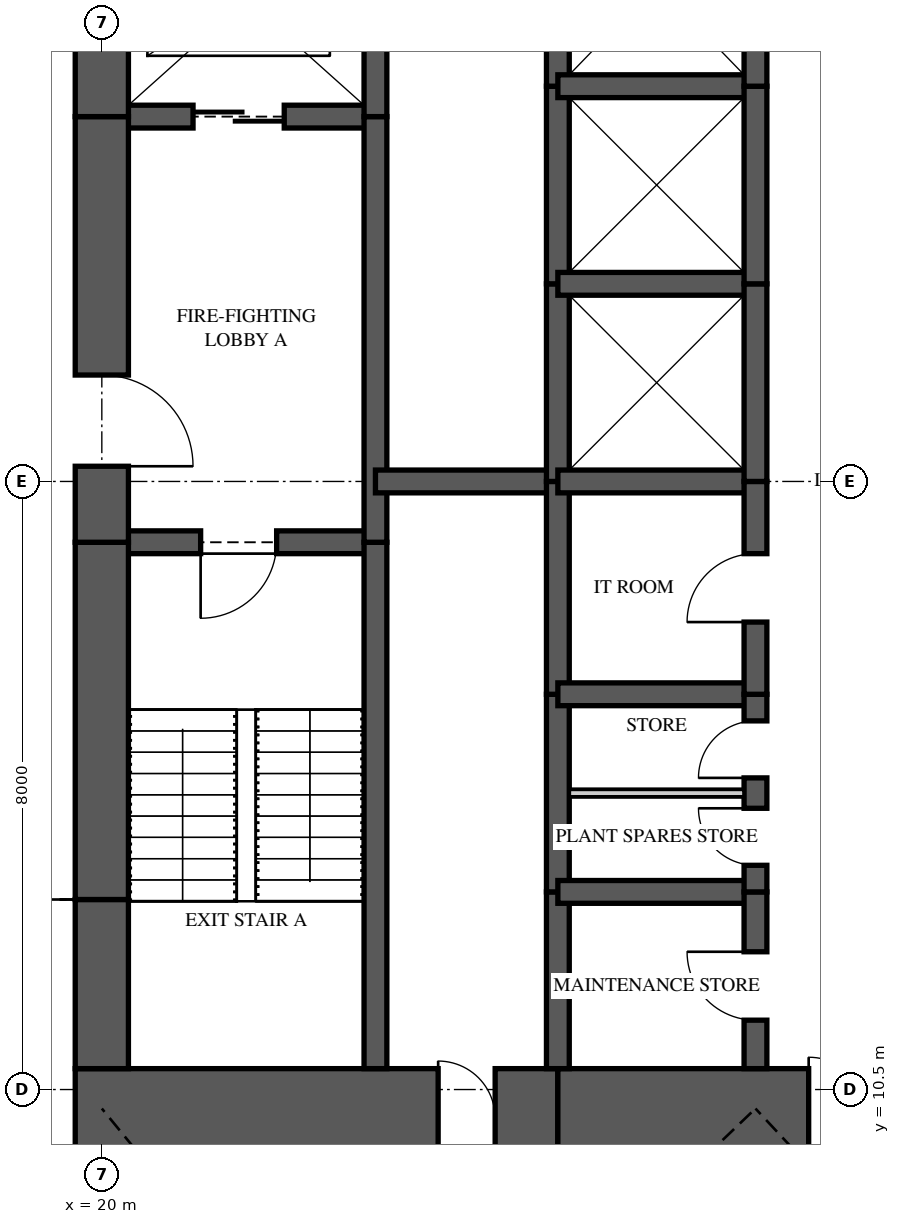
"""IFC4 building model, lengths in metres.
Left out: names, types, materials, properties, quantities, classifications, styles, units other than length and angle.
Written with IfcOpenShell. Run it as: python <this file> out.ifc"""

import sys

from ifc_helpers import new_model, si_unit, direction, frame, frame_2d, origin, place, context, subcontext, project, spatial, rectangle, extrude, element, fill, save


model = new_model("IFC4")
c1 = context("Model", 3, precision=1e-05, world=origin(), true_north=direction((0.0, 1.0)))
c2 = subcontext(c1, "Body", "Model", "MODEL_VIEW")
j1 = project(units=[si_unit("LENGTHUNIT", "METRE"), si_unit("PLANEANGLEUNIT", "RADIAN")], contexts=[c1])
p1 = place(None, origin())
s1 = spatial("IfcSite", under=j1, at=p1, CompositionType="ELEMENT")
p2 = place(p1, origin())
s2 = spatial("IfcBuilding", under=s1, at=p2, CompositionType="ELEMENT")
p3 = place(p2, frame((0.0, 0.0, 212.95)))
s3 = spatial("IfcBuildingStorey", under=s2, at=p3, CompositionType="ELEMENT", Elevation=212.95)
p4 = place(p3, frame((19.65, 10.125, 0.0), z_axis=(0.0, 0.0, 1.0), x_axis=(1.0, 0.0, 0.0)))
e1 = element("IfcWall", 1, at=p4, inside=s3, PredefinedType="SHEAR", context=c2, shape_type="SweptSolid", body=[
    extrude(rectangle(XDim=6.35, YDim=1.3, at=frame_2d((3.175, 0.0))), origin(), (0.0, 0.0, 1.0), 5.0),
])
p5 = place(p4, frame((4.775, 0.0, 0.0)))
e2 = element("IfcOpeningElement", 2, at=p5, cuts=e1, PredefinedType="OPENING", context=c2, shape_type="SweptSolid", body=[
    extrude(rectangle(XDim=0.75, YDim=2.1, at=frame_2d((0.375, 1.05))), frame((0.0, 0.66, 0.0), z_axis=(0.0, -1.0, 0.0), x_axis=(1.0, 0.0, 0.0)), (0.0, 0.0, 1.0), 1.32),
])
p6 = place(p3, frame((26.0, 10.125, 0.0), z_axis=(0.0, 0.0, 1.0), x_axis=(1.0, 0.0, 0.0)))
e3 = element("IfcWall", 3, at=p6, inside=s3, PredefinedType="SHEAR", context=c2, shape_type="SweptSolid", body=[
    extrude(rectangle(XDim=5.6, YDim=1.3, at=frame_2d((2.8, 0.0))), origin(), (0.0, 0.0, 1.0), 5.0),
])
p7 = place(p6, frame((3.3, 0.0, 0.0)))
e4 = element("IfcOpeningElement", 4, at=p7, cuts=e3, PredefinedType="OPENING", context=c2, shape_type="SweptSolid", body=[
    extrude(rectangle(XDim=1.6, YDim=2.1, at=frame_2d((0.8, 1.05))), frame((0.0, 0.66, 0.0), z_axis=(0.0, -1.0, 0.0), x_axis=(1.0, 0.0, 0.0)), (0.0, 0.0, 1.0), 1.32),
])
p8 = place(p3, frame((20.0, 26.225, 0.0), z_axis=(0.0, 0.0, 1.0), x_axis=(0.0, -1.0, 0.0)))
e5 = element("IfcWall", 5, at=p8, inside=s3, PredefinedType="SHEAR", context=c2, shape_type="SweptSolid", body=[
    extrude(rectangle(XDim=2.925, YDim=0.7, at=frame_2d((1.462, 0.0))), origin(), (0.0, 0.0, 1.0), 5.0),
])
p9 = place(p3, frame((20.0, 23.3, 0.0), z_axis=(0.0, 0.0, 1.0), x_axis=(0.0, -1.0, 0.0)))
e6 = element("IfcWall", 6, at=p9, inside=s3, PredefinedType="SHEAR", context=c2, shape_type="SweptSolid", body=[
    extrude(rectangle(XDim=5.6, YDim=0.7, at=frame_2d((2.8, 0.0))), origin(), (0.0, 0.0, 1.0), 5.0),
])
p10 = place(p9, frame((3.4, 0.0, 0.0)))
e7 = element("IfcOpeningElement", 7, at=p10, cuts=e6, PredefinedType="OPENING", context=c2, shape_type="SweptSolid", body=[
    extrude(rectangle(XDim=1.2, YDim=2.2, at=frame_2d((0.6, 1.1))), frame((0.0, 0.36, 0.0), z_axis=(0.0, -1.0, 0.0), x_axis=(1.0, 0.0, 0.0)), (0.0, 0.0, 1.0), 0.72),
])
p11 = place(p3, frame((20.0, 17.7, 0.0), z_axis=(0.0, 0.0, 1.0), x_axis=(0.0, -1.0, 0.0)))
e8 = element("IfcWall", 8, at=p11, inside=s3, PredefinedType="SHEAR", context=c2, shape_type="SweptSolid", body=[
    extrude(rectangle(XDim=4.7, YDim=0.7, at=frame_2d((2.35, 0.0))), origin(), (0.0, 0.0, 1.0), 5.0),
])
p12 = place(p3, frame((20.0, 13.0, 0.0), z_axis=(0.0, 0.0, 1.0), x_axis=(0.0, -1.0, 0.0)))
e9 = element("IfcWall", 9, at=p12, inside=s3, PredefinedType="SHEAR", context=c2, shape_type="SweptSolid", body=[
    extrude(rectangle(XDim=2.225, YDim=0.7, at=frame_2d((1.113, 0.0))), origin(), (0.0, 0.0, 1.0), 5.0),
])
p13 = place(p3, frame((23.6, 10.775, 0.0), z_axis=(0.0, 0.0, 1.0), x_axis=(0.0, 1.0, 0.0)))
e10 = element("IfcWall", 10, at=p13, inside=s3, PredefinedType="SHEAR", context=c2, shape_type="SweptSolid", body=[
    extrude(rectangle(XDim=6.925, YDim=0.3, at=frame_2d((3.462, 0.0))), origin(), (0.0, 0.0, 1.0), 5.0),
])
p14 = place(p3, frame((23.6, 17.7, 0.0), z_axis=(0.0, 0.0, 1.0), x_axis=(0.0, 1.0, 0.0)))
e11 = element("IfcWall", 11, at=p14, inside=s3, PredefinedType="SHEAR", context=c2, shape_type="SweptSolid", body=[
    extrude(rectangle(XDim=5.6, YDim=0.3, at=frame_2d((2.8, 0.0))), origin(), (0.0, 0.0, 1.0), 5.0),
])
p15 = place(p3, frame((23.6, 23.3, 0.0), z_axis=(0.0, 0.0, 1.0), x_axis=(0.0, 1.0, 0.0)))
e12 = element("IfcWall", 12, at=p15, inside=s3, PredefinedType="SHEAR", context=c2, shape_type="SweptSolid", body=[
    extrude(rectangle(XDim=2.925, YDim=0.3, at=frame_2d((1.462, 0.0))), origin(), (0.0, 0.0, 1.0), 5.0),
])
p16 = place(p3, frame((26.0, 10.775, 0.0), z_axis=(0.0, 0.0, 1.0), x_axis=(0.0, 1.0, 0.0)))
e13 = element("IfcWall", 13, at=p16, inside=s3, PredefinedType="SHEAR", context=c2, shape_type="SweptSolid", body=[
    extrude(rectangle(XDim=2.325, YDim=0.3, at=frame_2d((1.163, 0.0))), origin(), (0.0, 0.0, 1.0), 5.0),
])
p17 = place(p3, frame((26.0, 13.1, 0.0), z_axis=(0.0, 0.0, 1.0), x_axis=(0.0, 1.0, 0.0)))
e14 = element("IfcWall", 14, at=p17, inside=s3, PredefinedType="SHEAR", context=c2, shape_type="SweptSolid", body=[
    extrude(rectangle(XDim=2.6, YDim=0.3, at=frame_2d((1.3, 0.0))), origin(), (0.0, 0.0, 1.0), 5.0),
])
p18 = place(p3, frame((26.0, 15.7, 0.0), z_axis=(0.0, 0.0, 1.0), x_axis=(0.0, 1.0, 0.0)))
e15 = element("IfcWall", 15, at=p18, inside=s3, PredefinedType="SHEAR", context=c2, shape_type="SweptSolid", body=[
    extrude(rectangle(XDim=2.8, YDim=0.3, at=frame_2d((1.4, 0.0))), origin(), (0.0, 0.0, 1.0), 5.0),
])
p19 = place(p3, frame((26.0, 18.5, 0.0), z_axis=(0.0, 0.0, 1.0), x_axis=(0.0, 1.0, 0.0)))
e16 = element("IfcWall", 16, at=p19, inside=s3, PredefinedType="SHEAR", context=c2, shape_type="SweptSolid", body=[
    extrude(rectangle(XDim=2.6, YDim=0.3, at=frame_2d((1.3, 0.0))), origin(), (0.0, 0.0, 1.0), 5.0),
])
p20 = place(p3, frame((26.0, 21.1, 0.0), z_axis=(0.0, 0.0, 1.0), x_axis=(0.0, 1.0, 0.0)))
e17 = element("IfcWall", 17, at=p20, inside=s3, PredefinedType="SHEAR", context=c2, shape_type="SweptSolid", body=[
    extrude(rectangle(XDim=2.6, YDim=0.3, at=frame_2d((1.3, 0.0))), origin(), (0.0, 0.0, 1.0), 5.0),
])
p21 = place(p3, frame((26.0, 23.7, 0.0), z_axis=(0.0, 0.0, 1.0), x_axis=(0.0, 1.0, 0.0)))
e18 = element("IfcWall", 18, at=p21, inside=s3, PredefinedType="SHEAR", context=c2, shape_type="SweptSolid", body=[
    extrude(rectangle(XDim=2.525, YDim=0.3, at=frame_2d((1.263, 0.0))), origin(), (0.0, 0.0, 1.0), 5.0),
])
p22 = place(p3, frame((28.6, 10.775, 0.0), z_axis=(0.0, 0.0, 1.0), x_axis=(0.0, 1.0, 0.0)))
e19 = element("IfcWall", 19, at=p22, inside=s3, PredefinedType="SHEAR", context=c2, shape_type="SweptSolid", body=[
    extrude(rectangle(XDim=2.325, YDim=0.3, at=frame_2d((1.163, 0.0))), origin(), (0.0, 0.0, 1.0), 5.0),
])
p23 = place(p22, frame((0.637, 0.0, 0.0)))
e20 = element("IfcOpeningElement", 20, at=p23, cuts=e19, PredefinedType="OPENING", context=c2, shape_type="SweptSolid", body=[
    extrude(rectangle(XDim=0.9, YDim=2.1, at=frame_2d((0.45, 1.05))), frame((0.0, 0.16, 0.0), z_axis=(0.0, -1.0, 0.0), x_axis=(1.0, 0.0, 0.0)), (0.0, 0.0, 1.0), 0.32),
])
p24 = place(p3, frame((28.6, 13.1, 0.0), z_axis=(0.0, 0.0, 1.0), x_axis=(0.0, 1.0, 0.0)))
e21 = element("IfcWall", 21, at=p24, inside=s3, PredefinedType="SHEAR", context=c2, shape_type="SweptSolid", body=[
    extrude(rectangle(XDim=2.6, YDim=0.3, at=frame_2d((1.3, 0.0))), origin(), (0.0, 0.0, 1.0), 5.0),
])
p25 = place(p24, frame((0.35, 0.0, 0.0)))
e22 = element("IfcOpeningElement", 22, at=p25, cuts=e21, PredefinedType="OPENING", context=c2, shape_type="SweptSolid", body=[
    extrude(rectangle(XDim=0.75, YDim=2.1, at=frame_2d((0.375, 1.05))), frame((0.0, 0.16, 0.0), z_axis=(0.0, -1.0, 0.0), x_axis=(1.0, 0.0, 0.0)), (0.0, 0.0, 1.0), 0.32),
])
p26 = place(p24, frame((1.5, 0.0, 0.0)))
e23 = element("IfcOpeningElement", 23, at=p26, cuts=e21, PredefinedType="OPENING", context=c2, shape_type="SweptSolid", body=[
    extrude(rectangle(XDim=0.75, YDim=2.1, at=frame_2d((0.375, 1.05))), frame((0.0, 0.16, 0.0), z_axis=(0.0, -1.0, 0.0), x_axis=(1.0, 0.0, 0.0)), (0.0, 0.0, 1.0), 0.32),
])
p27 = place(p3, frame((28.6, 15.7, 0.0), z_axis=(0.0, 0.0, 1.0), x_axis=(0.0, 1.0, 0.0)))
e24 = element("IfcWall", 24, at=p27, inside=s3, PredefinedType="SHEAR", context=c2, shape_type="SweptSolid", body=[
    extrude(rectangle(XDim=2.8, YDim=0.3, at=frame_2d((1.4, 0.0))), origin(), (0.0, 0.0, 1.0), 5.0),
])
p28 = place(p27, frame((0.95, 0.0, 0.0)))
e25 = element("IfcOpeningElement", 25, at=p28, cuts=e24, PredefinedType="OPENING", context=c2, shape_type="SweptSolid", body=[
    extrude(rectangle(XDim=0.9, YDim=2.1, at=frame_2d((0.45, 1.05))), frame((0.0, 0.16, 0.0), z_axis=(0.0, -1.0, 0.0), x_axis=(1.0, 0.0, 0.0)), (0.0, 0.0, 1.0), 0.32),
])
p29 = place(p3, frame((28.6, 18.5, 0.0), z_axis=(0.0, 0.0, 1.0), x_axis=(0.0, 1.0, 0.0)))
e26 = element("IfcWall", 26, at=p29, inside=s3, PredefinedType="SHEAR", context=c2, shape_type="SweptSolid", body=[
    extrude(rectangle(XDim=2.6, YDim=0.3, at=frame_2d((1.3, 0.0))), origin(), (0.0, 0.0, 1.0), 5.0),
])
p30 = place(p3, frame((28.6, 21.1, 0.0), z_axis=(0.0, 0.0, 1.0), x_axis=(0.0, 1.0, 0.0)))
e27 = element("IfcWall", 27, at=p30, inside=s3, PredefinedType="SHEAR", context=c2, shape_type="SweptSolid", body=[
    extrude(rectangle(XDim=2.6, YDim=0.3, at=frame_2d((1.3, 0.0))), origin(), (0.0, 0.0, 1.0), 5.0),
])
p31 = place(p3, frame((28.6, 23.7, 0.0), z_axis=(0.0, 0.0, 1.0), x_axis=(0.0, 1.0, 0.0)))
e28 = element("IfcWall", 28, at=p31, inside=s3, PredefinedType="SHEAR", context=c2, shape_type="SweptSolid", body=[
    extrude(rectangle(XDim=2.525, YDim=0.3, at=frame_2d((1.263, 0.0))), origin(), (0.0, 0.0, 1.0), 5.0),
])
p32 = place(p3, frame((20.0, 17.7, 0.0), z_axis=(0.0, 0.0, 1.0), x_axis=(1.0, 0.0, 0.0)))
e29 = element("IfcWall", 29, at=p32, inside=s3, PredefinedType="SHEAR", context=c2, shape_type="SweptSolid", body=[
    extrude(rectangle(XDim=3.6, YDim=0.3, at=frame_2d((1.8, 0.0))), origin(), (0.0, 0.0, 1.0), 5.0),
])
p33 = place(p32, frame((1.3, 0.0, 0.0)))
e30 = element("IfcOpeningElement", 30, at=p33, cuts=e29, PredefinedType="OPENING", context=c2, shape_type="SweptSolid", body=[
    extrude(rectangle(XDim=1.0, YDim=2.1, at=frame_2d((0.5, 1.05))), frame((0.0, 0.16, 0.0), z_axis=(0.0, -1.0, 0.0), x_axis=(1.0, 0.0, 0.0)), (0.0, 0.0, 1.0), 0.32),
])
p34 = place(p3, frame((20.0, 23.3, 0.0), z_axis=(0.0, 0.0, 1.0), x_axis=(1.0, 0.0, 0.0)))
e31 = element("IfcWall", 31, at=p34, inside=s3, PredefinedType="SHEAR", context=c2, shape_type="SweptSolid", body=[
    extrude(rectangle(XDim=3.6, YDim=0.3, at=frame_2d((1.8, 0.0))), origin(), (0.0, 0.0, 1.0), 5.0),
])
p35 = place(p34, frame((1.2, 0.0, 0.0)))
e32 = element("IfcOpeningElement", 32, at=p35, cuts=e31, PredefinedType="OPENING", context=c2, shape_type="SweptSolid", body=[
    extrude(rectangle(XDim=1.2, YDim=2.1, at=frame_2d((0.6, 1.05))), frame((0.0, 0.16, 0.0), z_axis=(0.0, -1.0, 0.0), x_axis=(1.0, 0.0, 0.0)), (0.0, 0.0, 1.0), 0.32),
])
p36 = place(p3, frame((23.6, 18.5, 0.0), z_axis=(0.0, 0.0, 1.0), x_axis=(1.0, 0.0, 0.0)))
e33 = element("IfcWall", 33, at=p36, inside=s3, PredefinedType="SHEAR", context=c2, shape_type="SweptSolid", body=[
    extrude(rectangle(XDim=2.4, YDim=0.3, at=frame_2d((1.2, 0.0))), origin(), (0.0, 0.0, 1.0), 5.0),
])
for number, where, z_axis, x_axis in (
    (34, (26.0, 13.1, 0.0), (0.0, 0.0, 1.0), (1.0, 0.0, 0.0)),
    (35, (26.0, 15.7, 0.0), (0.0, 0.0, 1.0), (1.0, 0.0, 0.0)),
    (36, (26.0, 18.5, 0.0), (0.0, 0.0, 1.0), (1.0, 0.0, 0.0)),
    (37, (26.0, 21.1, 0.0), (0.0, 0.0, 1.0), (1.0, 0.0, 0.0)),
    (38, (26.0, 23.7, 0.0), (0.0, 0.0, 1.0), (1.0, 0.0, 0.0)),
):
    element("IfcWall", number, at=place(p3, frame(where, z_axis=z_axis, x_axis=x_axis)), inside=s3, PredefinedType="SHEAR", context=c2, shape_type="SweptSolid", body=[
        extrude(rectangle(XDim=2.6, YDim=0.3, at=frame_2d((1.3, 0.0))), origin(), (0.0, 0.0, 1.0), 5.0),
    ])
p37 = place(p3, frame((26.15, 14.4, 0.0), z_axis=(0.0, 0.0, 1.0), x_axis=(1.0, 0.0, 0.0)))
e39 = element("IfcWall", 39, at=p37, inside=s3, PredefinedType="PARTITIONING", context=c2, shape_type="SweptSolid", body=[
    extrude(rectangle(XDim=2.3, YDim=0.1, at=frame_2d((1.15, 0.0))), origin(), (0.0, 0.0, 1.0), 4.72),
])
p38 = place(p33, frame((1.0, 0.0, 0.0), z_axis=(0.0, 0.0, 1.0), x_axis=(-1.0, 0.0, 0.0)))
e40 = element("IfcDoor", 40, at=p38, inside=s3, OperationType="SINGLE_SWING_RIGHT", PredefinedType="DOOR", context=c2, shape_type="SweptSolid", body=[
    extrude(rectangle(XDim=1.0, YDim=2.1, at=frame_2d((0.5, 1.05))), frame((0.0, 0.025, 0.0), z_axis=(0.0, -1.0, 0.0), x_axis=(1.0, 0.0, 0.0)), (0.0, 0.0, 1.0), 0.05),
])
fill(e30, e40)
p39 = place(p10, origin())
e41 = element("IfcDoor", 41, at=p39, inside=s3, OperationType="SINGLE_SWING_RIGHT", PredefinedType="DOOR", context=c2, shape_type="SweptSolid", body=[
    extrude(rectangle(XDim=1.2, YDim=2.2, at=frame_2d((0.6, 1.1))), frame((0.0, 0.025, 0.0), z_axis=(0.0, -1.0, 0.0), x_axis=(1.0, 0.0, 0.0)), (0.0, 0.0, 1.0), 0.05),
])
fill(e7, e41)
p40 = place(p35, origin())
e42 = element("IfcDoor", 42, at=p40, inside=s3, OperationType="SLIDING_TO_LEFT", PredefinedType="DOOR", context=c2, shape_type="SweptSolid", body=[
    extrude(rectangle(XDim=1.2, YDim=2.1, at=frame_2d((0.6, 1.05))), frame((0.0, 0.025, 0.0), z_axis=(0.0, -1.0, 0.0), x_axis=(1.0, 0.0, 0.0)), (0.0, 0.0, 1.0), 0.05),
])
fill(e32, e42)
p41 = place(p23, origin())
e43 = element("IfcDoor", 43, at=p41, inside=s3, OperationType="SINGLE_SWING_RIGHT", PredefinedType="DOOR", context=c2, shape_type="SweptSolid", body=[
    extrude(rectangle(XDim=0.9, YDim=2.1, at=frame_2d((0.45, 1.05))), frame((0.0, 0.025, 0.0), z_axis=(0.0, -1.0, 0.0), x_axis=(1.0, 0.0, 0.0)), (0.0, 0.0, 1.0), 0.05),
])
fill(e20, e43)
p42 = place(p25, origin())
e44 = element("IfcDoor", 44, at=p42, inside=s3, OperationType="SINGLE_SWING_RIGHT", PredefinedType="DOOR", context=c2, shape_type="SweptSolid", body=[
    extrude(rectangle(XDim=0.75, YDim=2.1, at=frame_2d((0.375, 1.05))), frame((0.0, 0.025, 0.0), z_axis=(0.0, -1.0, 0.0), x_axis=(1.0, 0.0, 0.0)), (0.0, 0.0, 1.0), 0.05),
])
fill(e22, e44)
p43 = place(p26, origin())
e45 = element("IfcDoor", 45, at=p43, inside=s3, OperationType="SINGLE_SWING_LEFT", PredefinedType="DOOR", context=c2, shape_type="SweptSolid", body=[
    extrude(rectangle(XDim=0.75, YDim=2.1, at=frame_2d((0.375, 1.05))), frame((0.0, 0.025, 0.0), z_axis=(0.0, -1.0, 0.0), x_axis=(1.0, 0.0, 0.0)), (0.0, 0.0, 1.0), 0.05),
])
fill(e23, e45)
p44 = place(p28, origin())
e46 = element("IfcDoor", 46, at=p44, inside=s3, OperationType="SINGLE_SWING_LEFT", PredefinedType="DOOR", context=c2, shape_type="SweptSolid", body=[
    extrude(rectangle(XDim=0.9, YDim=2.1, at=frame_2d((0.45, 1.05))), frame((0.0, 0.025, 0.0), z_axis=(0.0, -1.0, 0.0), x_axis=(1.0, 0.0, 0.0)), (0.0, 0.0, 1.0), 0.05),
])
fill(e25, e46)
p45 = place(p7, origin())
e47 = element("IfcDoor", 47, at=p45, inside=s3, OperationType="DOUBLE_DOOR_SINGLE_SWING", PredefinedType="DOOR", context=c2, shape_type="SweptSolid", body=[
    extrude(rectangle(XDim=1.6, YDim=2.1, at=frame_2d((0.8, 1.05))), frame((0.0, 0.025, 0.0), z_axis=(0.0, -1.0, 0.0), x_axis=(1.0, 0.0, 0.0)), (0.0, 0.0, 1.0), 0.05),
])
fill(e4, e47)
p46 = place(p5, origin())
e48 = element("IfcDoor", 48, at=p46, inside=s3, OperationType="SINGLE_SWING_LEFT", PredefinedType="DOOR", context=c2, shape_type="SweptSolid", body=[
    extrude(rectangle(XDim=0.75, YDim=2.1, at=frame_2d((0.375, 1.05))), frame((0.0, 0.025, 0.0), z_axis=(0.0, -1.0, 0.0), x_axis=(1.0, 0.0, 0.0)), (0.0, 0.0, 1.0), 0.05),
])
fill(e2, e48)
save(model, sys.argv[1])
